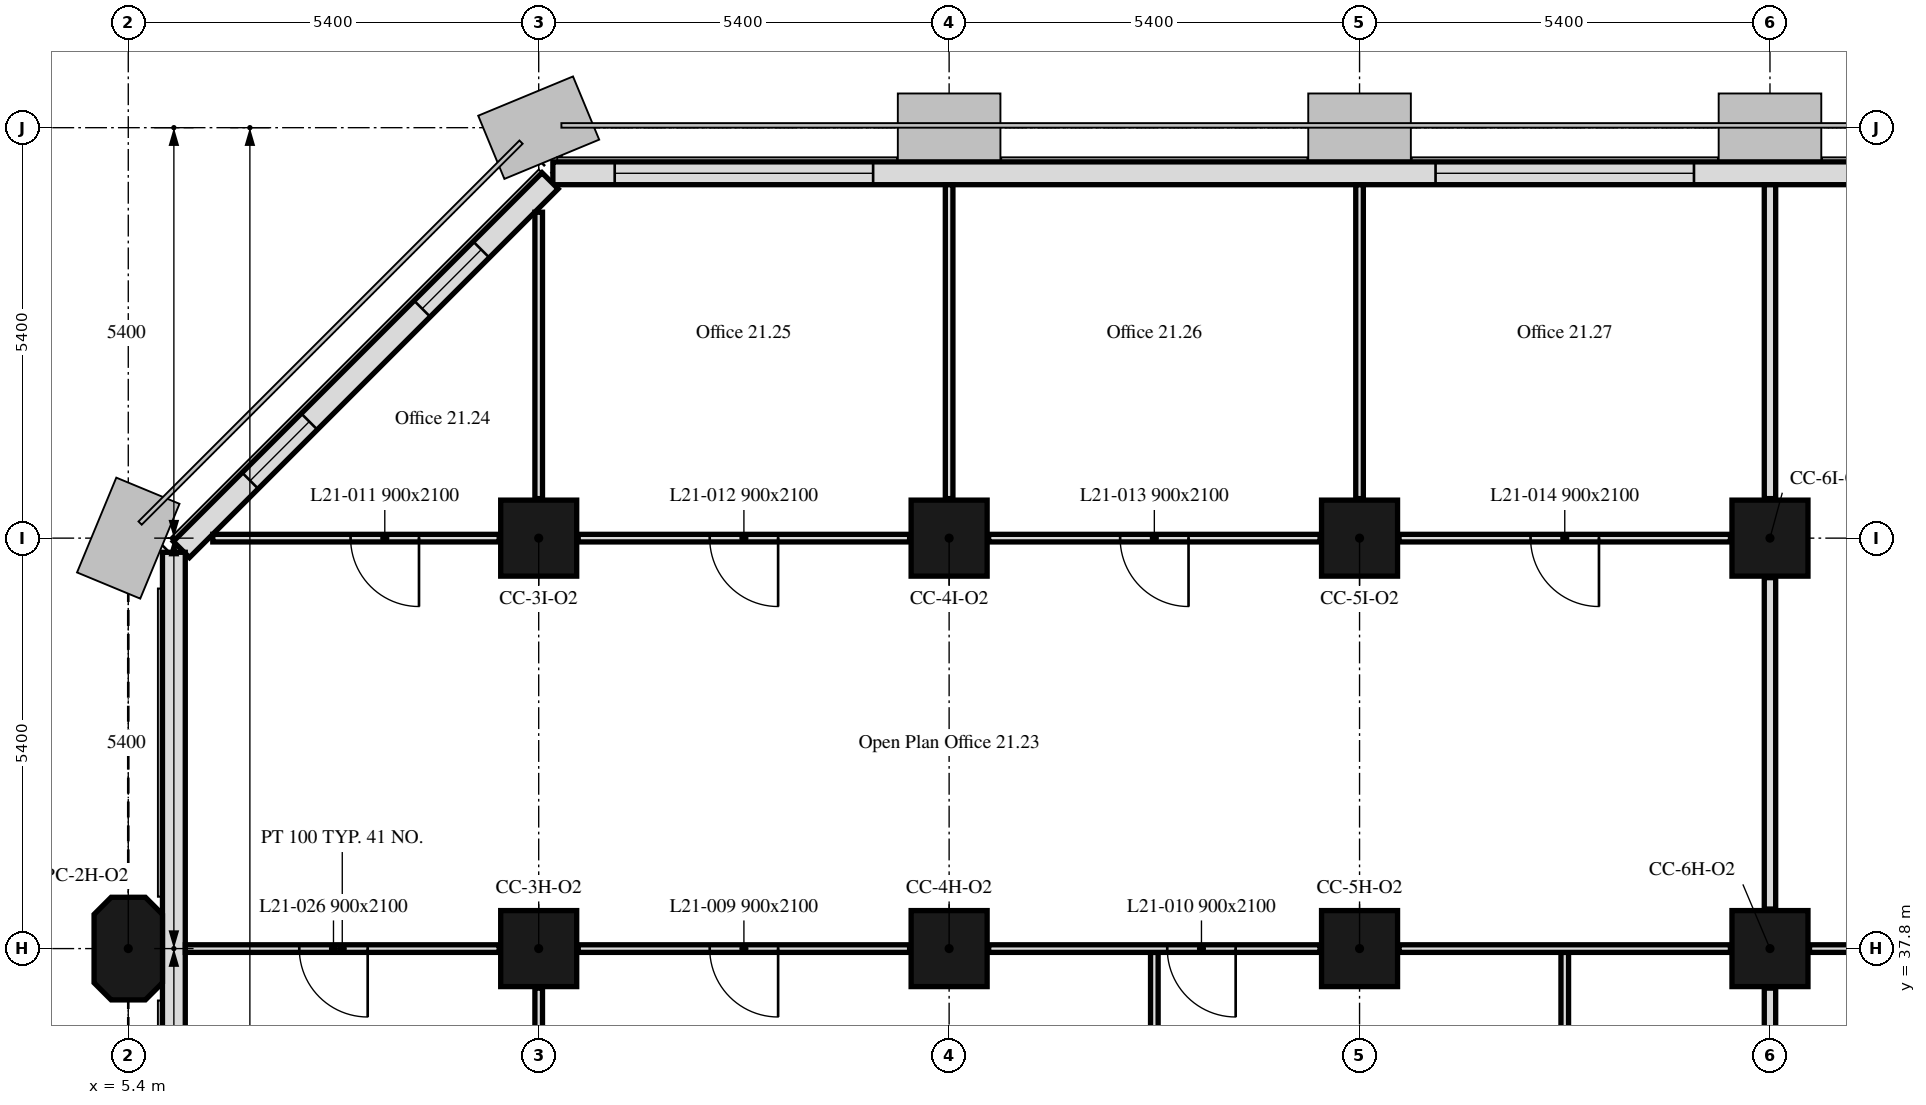
"""IFC4 building model, lengths in metres.
Left out: names, types, materials, properties, quantities, classifications, styles, units other than length and angle.
Written with IfcOpenShell. Run it as: python <this file> out.ifc"""

import sys

from ifc_helpers import new_model, si_unit, direction, frame, frame_2d, origin, origin_2d, place, context, subcontext, project, spatial, polyline, rectangle, outline, extrude, element, fill, save


model = new_model("IFC4")
c1 = context("Model", 3, precision=1e-05, world=origin(), true_north=direction((0.0, 1.0)))
c2 = subcontext(c1, "Body", "Model", "MODEL_VIEW")
j1 = project(units=[si_unit("LENGTHUNIT", "METRE"), si_unit("PLANEANGLEUNIT", "RADIAN")], contexts=[c1])
p1 = place(None, origin())
s1 = spatial("IfcSite", under=j1, at=p1, CompositionType="ELEMENT")
p2 = place(p1, origin())
s2 = spatial("IfcBuilding", under=s1, at=p2, CompositionType="ELEMENT")
p3 = place(p2, frame((0.0, 0.0, 91.6)))
s3 = spatial("IfcBuildingStorey", under=s2, at=p3, CompositionType="ELEMENT", Elevation=91.6)
p4 = place(p3, frame((5.4, 37.8, 0.0), z_axis=(0.0, 0.0, 1.0), x_axis=(0.0, 1.0, 0.0)))
e1 = element("IfcColumn", 1, at=p4, inside=s3, PredefinedType="COLUMN", context=c2, shape_type="SweptSolid", body=[
    extrude(outline(polyline([(-0.45, -0.45), (0.45, -0.45), (0.675, -0.225), (0.675, 0.225), (0.45, 0.45), (-0.45, 0.45), (-0.675, 0.225), (-0.675, -0.225), (-0.45, -0.45)])), origin(), (0.0, 0.0, 1.0), 3.5),
])
for number, where, z_axis, x_axis in (
    (2, (10.8, 37.8, 0.0), (0.0, 0.0, 1.0), (1.0, 0.0, 0.0)),
    (3, (16.2, 37.8, 0.0), (0.0, 0.0, 1.0), (1.0, 0.0, 0.0)),
    (4, (21.6, 37.8, 0.0), (0.0, 0.0, 1.0), (1.0, 0.0, 0.0)),
    (5, (27.0, 37.8, 0.0), (0.0, 0.0, 1.0), (1.0, 0.0, 0.0)),
    (6, (10.8, 43.2, 0.0), (0.0, 0.0, 1.0), (1.0, 0.0, 0.0)),
    (7, (16.2, 43.2, 0.0), (0.0, 0.0, 1.0), (1.0, 0.0, 0.0)),
    (8, (21.6, 43.2, 0.0), (0.0, 0.0, 1.0), (1.0, 0.0, 0.0)),
    (9, (27.0, 43.2, 0.0), (0.0, 0.0, 1.0), (1.0, 0.0, 0.0)),
):
    element("IfcColumn", number, at=place(p3, frame(where, z_axis=z_axis, x_axis=x_axis)), inside=s3, PredefinedType="COLUMN", context=c2, shape_type="SweptSolid", body=[
        extrude(rectangle(XDim=1.0, YDim=1.0, at=origin_2d()), origin(), (0.0, 0.0, 1.0), 3.5),
    ])
p5 = place(p3, frame((43.014, 48.0, 0.0), z_axis=(0.0, 0.0, 1.0), x_axis=(-1.0, 0.0, 0.0)))
e10 = element("IfcWall", 10, at=p5, inside=s3, PredefinedType="SOLIDWALL", context=c2, shape_type="SweptSolid", body=[
    extrude(rectangle(XDim=32.027, YDim=0.3, at=frame_2d((16.014, 0.0))), origin(), (0.0, 0.0, 1.0), 3.5),
])
p6 = place(p5, frame((6.214, 0.0, 0.9)))
e11 = element("IfcOpeningElement", 11, at=p6, cuts=e10, PredefinedType="OPENING", context=c2, shape_type="SweptSolid", body=[
    extrude(rectangle(XDim=3.4, YDim=1.7, at=frame_2d((1.7, 0.85))), frame((0.0, 0.16, 0.0), z_axis=(0.0, -1.0, 0.0), x_axis=(1.0, 0.0, 0.0)), (0.0, 0.0, 1.0), 0.32),
])
p7 = place(p5, frame((17.014, 0.0, 0.9)))
e12 = element("IfcOpeningElement", 12, at=p7, cuts=e10, PredefinedType="OPENING", context=c2, shape_type="SweptSolid", body=[
    extrude(rectangle(XDim=3.4, YDim=1.7, at=frame_2d((1.7, 0.85))), frame((0.0, 0.16, 0.0), z_axis=(0.0, -1.0, 0.0), x_axis=(1.0, 0.0, 0.0)), (0.0, 0.0, 1.0), 0.32),
])
p8 = place(p5, frame((27.814, 0.0, 0.9)))
e13 = element("IfcOpeningElement", 13, at=p8, cuts=e10, PredefinedType="OPENING", context=c2, shape_type="SweptSolid", body=[
    extrude(rectangle(XDim=3.4, YDim=1.7, at=frame_2d((1.7, 0.85))), frame((0.0, 0.16, 0.0), z_axis=(0.0, -1.0, 0.0), x_axis=(1.0, 0.0, 0.0)), (0.0, 0.0, 1.0), 0.32),
])
p9 = place(p3, frame((10.949, 47.901, 0.0), z_axis=(0.0, 0.0, 1.0), x_axis=(-0.707106781187, -0.707106781187, 0.0)))
e14 = element("IfcWall", 14, at=p9, inside=s3, PredefinedType="SOLIDWALL", context=c2, shape_type="SweptSolid", body=[
    extrude(rectangle(XDim=6.86, YDim=0.3, at=frame_2d((3.43, 0.0))), origin(), (0.0, 0.0, 1.0), 3.5),
])
p10 = place(p9, frame((1.28, 0.0, 0.9)))
e15 = element("IfcOpeningElement", 15, at=p10, cuts=e14, PredefinedType="OPENING", context=c2, shape_type="SweptSolid", body=[
    extrude(rectangle(XDim=1.1, YDim=1.7, at=frame_2d((0.55, 0.85))), frame((0.0, 0.16, 0.0), z_axis=(0.0, -1.0, 0.0), x_axis=(1.0, 0.0, 0.0)), (0.0, 0.0, 1.0), 0.32),
])
p11 = place(p9, frame((4.48, 0.0, 0.9)))
e16 = element("IfcOpeningElement", 16, at=p11, cuts=e14, PredefinedType="OPENING", context=c2, shape_type="SweptSolid", body=[
    extrude(rectangle(XDim=1.1, YDim=1.7, at=frame_2d((0.55, 0.85))), frame((0.0, 0.16, 0.0), z_axis=(0.0, -1.0, 0.0), x_axis=(1.0, 0.0, 0.0)), (0.0, 0.0, 1.0), 0.32),
])
p12 = place(p3, frame((6.0, 43.014, 0.0), z_axis=(0.0, 0.0, 1.0), x_axis=(0.0, -1.0, 0.0)))
e17 = element("IfcWall", 17, at=p12, inside=s3, PredefinedType="SOLIDWALL", context=c2, shape_type="SweptSolid", body=[
    extrude(rectangle(XDim=10.614, YDim=0.3, at=frame_2d((5.307, 0.0))), origin(), (0.0, 0.0, 1.0), 3.5),
])
p13 = place(p12, frame((6.564, 0.0, 0.9)))
e18 = element("IfcOpeningElement", 18, at=p13, cuts=e17, PredefinedType="OPENING", context=c2, shape_type="SweptSolid", body=[
    extrude(rectangle(XDim=1.1, YDim=1.7, at=frame_2d((0.55, 0.85))), frame((0.0, 0.16, 0.0), z_axis=(0.0, -1.0, 0.0), x_axis=(1.0, 0.0, 0.0)), (0.0, 0.0, 1.0), 0.32),
])
p14 = place(p12, frame((8.164, 0.0, 0.9)))
e19 = element("IfcOpeningElement", 19, at=p14, cuts=e17, PredefinedType="OPENING", context=c2, shape_type="SweptSolid", body=[
    extrude(rectangle(XDim=1.1, YDim=1.7, at=frame_2d((0.55, 0.85))), frame((0.0, 0.16, 0.0), z_axis=(0.0, -1.0, 0.0), x_axis=(1.0, 0.0, 0.0)), (0.0, 0.0, 1.0), 0.32),
])
p15 = place(p3, frame((10.28, 37.8, 0.0), z_axis=(0.0, 0.0, 1.0), x_axis=(-1.0, 0.0, 0.0)))
e20 = element("IfcWall", 20, at=p15, inside=s3, PredefinedType="PARTITIONING", context=c2, shape_type="SweptSolid", body=[
    extrude(rectangle(XDim=4.129, YDim=0.1, at=frame_2d((2.064, 0.0))), origin(), (0.0, 0.0, 1.0), 2.75),
])
p16 = place(p15, frame((1.73, 0.0, 0.0)))
e21 = element("IfcOpeningElement", 21, at=p16, cuts=e20, PredefinedType="OPENING", context=c2, shape_type="SweptSolid", body=[
    extrude(rectangle(XDim=0.9, YDim=2.1, at=frame_2d((0.45, 1.05))), frame((0.0, 0.05, 0.0), z_axis=(0.0, -1.0, 0.0), x_axis=(1.0, 0.0, 0.0)), (0.0, 0.0, 1.0), 0.1),
])
p17 = place(p3, frame((10.8, 35.175, 0.0), z_axis=(0.0, 0.0, 1.0), x_axis=(0.0, 1.0, 0.0)))
e22 = element("IfcWall", 22, at=p17, inside=s3, PredefinedType="PARTITIONING", context=c2, shape_type="SweptSolid", body=[
    extrude(rectangle(XDim=2.105, YDim=0.1, at=frame_2d((1.052, 0.0))), origin(), (0.0, 0.0, 1.0), 2.75),
])
p18 = place(p3, frame((18.9, 35.175, 0.0), z_axis=(0.0, 0.0, 1.0), x_axis=(0.0, 1.0, 0.0)))
e23 = element("IfcWall", 23, at=p18, inside=s3, PredefinedType="PARTITIONING", context=c2, shape_type="SweptSolid", body=[
    extrude(rectangle(XDim=2.575, YDim=0.1, at=frame_2d((1.288, 0.0))), origin(), (0.0, 0.0, 1.0), 3.5),
])
p19 = place(p3, frame((15.68, 37.8, 0.0), z_axis=(0.0, 0.0, 1.0), x_axis=(-1.0, 0.0, 0.0)))
e24 = element("IfcWall", 24, at=p19, inside=s3, PredefinedType="PARTITIONING", context=c2, shape_type="SweptSolid", body=[
    extrude(rectangle(XDim=4.36, YDim=0.1, at=frame_2d((2.18, 0.0))), origin(), (0.0, 0.0, 1.0), 2.75),
])
p20 = place(p19, frame((1.73, 0.0, 0.0)))
e25 = element("IfcOpeningElement", 25, at=p20, cuts=e24, PredefinedType="OPENING", context=c2, shape_type="SweptSolid", body=[
    extrude(rectangle(XDim=0.9, YDim=2.1, at=frame_2d((0.45, 1.05))), frame((0.0, 0.05, 0.0), z_axis=(0.0, -1.0, 0.0), x_axis=(1.0, 0.0, 0.0)), (0.0, 0.0, 1.0), 0.1),
])
p21 = place(p3, frame((24.3, 35.175, 0.0), z_axis=(0.0, 0.0, 1.0), x_axis=(0.0, 1.0, 0.0)))
e26 = element("IfcWall", 26, at=p21, inside=s3, PredefinedType="PARTITIONING", context=c2, shape_type="SweptSolid", body=[
    extrude(rectangle(XDim=2.575, YDim=0.1, at=frame_2d((1.288, 0.0))), origin(), (0.0, 0.0, 1.0), 3.5),
])
p22 = place(p3, frame((21.08, 37.8, 0.0), z_axis=(0.0, 0.0, 1.0), x_axis=(-1.0, 0.0, 0.0)))
e27 = element("IfcWall", 27, at=p22, inside=s3, PredefinedType="PARTITIONING", context=c2, shape_type="SweptSolid", body=[
    extrude(rectangle(XDim=4.36, YDim=0.1, at=frame_2d((2.18, 0.0))), origin(), (0.0, 0.0, 1.0), 3.5),
])
p23 = place(p22, frame((1.11, 0.0, 0.0)))
e28 = element("IfcOpeningElement", 28, at=p23, cuts=e27, PredefinedType="OPENING", context=c2, shape_type="SweptSolid", body=[
    extrude(rectangle(XDim=0.9, YDim=2.1, at=frame_2d((0.45, 1.05))), frame((0.0, 0.05, 0.0), z_axis=(0.0, -1.0, 0.0), x_axis=(1.0, 0.0, 0.0)), (0.0, 0.0, 1.0), 0.1),
])
p24 = place(p3, frame((27.0, 35.175, 0.0), z_axis=(0.0, 0.0, 1.0), x_axis=(0.0, 1.0, 0.0)))
e29 = element("IfcWall", 29, at=p24, inside=s3, PredefinedType="PARTITIONING", context=c2, shape_type="SweptSolid", body=[
    extrude(rectangle(XDim=2.105, YDim=0.15, at=frame_2d((1.052, 0.0))), origin(), (0.0, 0.0, 1.0), 2.75),
])
p25 = place(p3, frame((26.48, 37.8, 0.0), z_axis=(0.0, 0.0, 1.0), x_axis=(-1.0, 0.0, 0.0)))
e30 = element("IfcWall", 30, at=p25, inside=s3, PredefinedType="PARTITIONING", context=c2, shape_type="SweptSolid", body=[
    extrude(rectangle(XDim=4.36, YDim=0.1, at=frame_2d((2.18, 0.0))), origin(), (0.0, 0.0, 1.0), 3.5),
])
p26 = place(p3, frame((26.48, 43.2, 0.0), z_axis=(0.0, 0.0, 1.0), x_axis=(-1.0, 0.0, 0.0)))
e31 = element("IfcWall", 31, at=p26, inside=s3, PredefinedType="PARTITIONING", context=c2, shape_type="SweptSolid", body=[
    extrude(rectangle(XDim=4.36, YDim=0.1, at=frame_2d((2.18, 0.0))), origin(), (0.0, 0.0, 1.0), 3.5),
])
p27 = place(p26, frame((1.73, 0.0, 0.0)))
e32 = element("IfcOpeningElement", 32, at=p27, cuts=e31, PredefinedType="OPENING", context=c2, shape_type="SweptSolid", body=[
    extrude(rectangle(XDim=0.9, YDim=2.1, at=frame_2d((0.45, 1.05))), frame((0.0, 0.05, 0.0), z_axis=(0.0, -1.0, 0.0), x_axis=(1.0, 0.0, 0.0)), (0.0, 0.0, 1.0), 0.1),
])
p28 = place(p3, frame((21.08, 43.2, 0.0), z_axis=(0.0, 0.0, 1.0), x_axis=(-1.0, 0.0, 0.0)))
e33 = element("IfcWall", 33, at=p28, inside=s3, PredefinedType="PARTITIONING", context=c2, shape_type="SweptSolid", body=[
    extrude(rectangle(XDim=4.36, YDim=0.1, at=frame_2d((2.18, 0.0))), origin(), (0.0, 0.0, 1.0), 3.5),
])
p29 = place(p28, frame((1.73, 0.0, 0.0)))
e34 = element("IfcOpeningElement", 34, at=p29, cuts=e33, PredefinedType="OPENING", context=c2, shape_type="SweptSolid", body=[
    extrude(rectangle(XDim=0.9, YDim=2.1, at=frame_2d((0.45, 1.05))), frame((0.0, 0.05, 0.0), z_axis=(0.0, -1.0, 0.0), x_axis=(1.0, 0.0, 0.0)), (0.0, 0.0, 1.0), 0.1),
])
p30 = place(p3, frame((15.68, 43.2, 0.0), z_axis=(0.0, 0.0, 1.0), x_axis=(-1.0, 0.0, 0.0)))
e35 = element("IfcWall", 35, at=p30, inside=s3, PredefinedType="PARTITIONING", context=c2, shape_type="SweptSolid", body=[
    extrude(rectangle(XDim=4.36, YDim=0.1, at=frame_2d((2.18, 0.0))), origin(), (0.0, 0.0, 1.0), 3.5),
])
p31 = place(p30, frame((1.73, 0.0, 0.0)))
e36 = element("IfcOpeningElement", 36, at=p31, cuts=e35, PredefinedType="OPENING", context=c2, shape_type="SweptSolid", body=[
    extrude(rectangle(XDim=0.9, YDim=2.1, at=frame_2d((0.45, 1.05))), frame((0.0, 0.05, 0.0), z_axis=(0.0, -1.0, 0.0), x_axis=(1.0, 0.0, 0.0)), (0.0, 0.0, 1.0), 0.1),
])
p32 = place(p3, frame((10.28, 43.2, 0.0), z_axis=(0.0, 0.0, 1.0), x_axis=(-1.0, 0.0, 0.0)))
e37 = element("IfcWall", 37, at=p32, inside=s3, PredefinedType="PARTITIONING", context=c2, shape_type="SweptSolid", body=[
    extrude(rectangle(XDim=3.768, YDim=0.1, at=frame_2d((1.884, 0.0))), origin(), (0.0, 0.0, 1.0), 3.5),
])
p33 = place(p32, frame((1.055, 0.0, 0.0)))
e38 = element("IfcOpeningElement", 38, at=p33, cuts=e37, PredefinedType="OPENING", context=c2, shape_type="SweptSolid", body=[
    extrude(rectangle(XDim=0.9, YDim=2.1, at=frame_2d((0.45, 1.05))), frame((0.0, 0.05, 0.0), z_axis=(0.0, -1.0, 0.0), x_axis=(1.0, 0.0, 0.0)), (0.0, 0.0, 1.0), 0.1),
])
p34 = place(p3, frame((27.0, 38.32, 0.0), z_axis=(0.0, 0.0, 1.0), x_axis=(0.0, 1.0, 0.0)))
e39 = element("IfcWall", 39, at=p34, inside=s3, PredefinedType="PARTITIONING", context=c2, shape_type="SweptSolid", body=[
    extrude(rectangle(XDim=4.36, YDim=0.15, at=frame_2d((2.18, 0.0))), origin(), (0.0, 0.0, 1.0), 2.75),
])
p35 = place(p3, frame((10.8, 43.72, 0.0), z_axis=(0.0, 0.0, 1.0), x_axis=(0.0, 1.0, 0.0)))
e40 = element("IfcWall", 40, at=p35, inside=s3, PredefinedType="PARTITIONING", context=c2, shape_type="SweptSolid", body=[
    extrude(rectangle(XDim=3.768, YDim=0.1, at=frame_2d((1.884, 0.0))), origin(), (0.0, 0.0, 1.0), 2.75),
])
for number, where, z_axis, x_axis in (
    (41, (16.2, 43.72, 0.0), (0.0, 0.0, 1.0), (0.0, 1.0, 0.0)),
    (42, (21.6, 43.72, 0.0), (0.0, 0.0, 1.0), (0.0, 1.0, 0.0)),
):
    element("IfcWall", number, at=place(p3, frame(where, z_axis=z_axis, x_axis=x_axis)), inside=s3, PredefinedType="PARTITIONING", context=c2, shape_type="SweptSolid", body=[
        extrude(rectangle(XDim=4.129, YDim=0.1, at=frame_2d((2.064, 0.0))), origin(), (0.0, 0.0, 1.0), 2.75),
    ])
p36 = place(p3, frame((27.0, 43.72, 0.0), z_axis=(0.0, 0.0, 1.0), x_axis=(0.0, 1.0, 0.0)))
e43 = element("IfcWall", 43, at=p36, inside=s3, PredefinedType="PARTITIONING", context=c2, shape_type="SweptSolid", body=[
    extrude(rectangle(XDim=4.129, YDim=0.15, at=frame_2d((2.064, 0.0))), origin(), (0.0, 0.0, 1.0), 2.75),
])
p37 = place(p3, frame((31.88, 37.8, 0.0), z_axis=(0.0, 0.0, 1.0), x_axis=(-1.0, 0.0, 0.0)))
e44 = element("IfcWall", 44, at=p37, inside=s3, PredefinedType="PARTITIONING", context=c2, shape_type="SweptSolid", body=[
    extrude(rectangle(XDim=4.36, YDim=0.1, at=frame_2d((2.18, 0.0))), origin(), (0.0, 0.0, 1.0), 3.5),
])
p38 = place(p37, frame((1.73, 0.0, 0.0)))
e45 = element("IfcOpeningElement", 45, at=p38, cuts=e44, PredefinedType="OPENING", context=c2, shape_type="SweptSolid", body=[
    extrude(rectangle(XDim=0.9, YDim=2.1, at=frame_2d((0.45, 1.05))), frame((0.0, 0.05, 0.0), z_axis=(0.0, -1.0, 0.0), x_axis=(1.0, 0.0, 0.0)), (0.0, 0.0, 1.0), 0.1),
])
p39 = place(p7, origin())
e46 = element("IfcWindow", 46, at=p39, inside=s3, PartitioningType="SINGLE_PANEL", PredefinedType="WINDOW", context=c2, shape_type="SweptSolid", body=[
    extrude(rectangle(XDim=3.4, YDim=1.7, at=frame_2d((1.7, 0.85))), frame((0.0, 0.03, 0.0), z_axis=(0.0, -1.0, 0.0), x_axis=(1.0, 0.0, 0.0)), (0.0, 0.0, 1.0), 0.06),
])
fill(e12, e46)
p40 = place(p8, origin())
e47 = element("IfcWindow", 47, at=p40, inside=s3, PartitioningType="SINGLE_PANEL", PredefinedType="WINDOW", context=c2, shape_type="SweptSolid", body=[
    extrude(rectangle(XDim=3.4, YDim=1.7, at=frame_2d((1.7, 0.85))), frame((0.0, 0.03, 0.0), z_axis=(0.0, -1.0, 0.0), x_axis=(1.0, 0.0, 0.0)), (0.0, 0.0, 1.0), 0.06),
])
fill(e13, e47)
p41 = place(p10, origin())
e48 = element("IfcWindow", 48, at=p41, inside=s3, PartitioningType="SINGLE_PANEL", PredefinedType="WINDOW", context=c2, shape_type="SweptSolid", body=[
    extrude(rectangle(XDim=1.1, YDim=1.7, at=frame_2d((0.55, 0.85))), frame((0.0, 0.03, 0.0), z_axis=(0.0, -1.0, 0.0), x_axis=(1.0, 0.0, 0.0)), (0.0, 0.0, 1.0), 0.06),
])
fill(e15, e48)
p42 = place(p11, origin())
e49 = element("IfcWindow", 49, at=p42, inside=s3, PartitioningType="SINGLE_PANEL", PredefinedType="WINDOW", context=c2, shape_type="SweptSolid", body=[
    extrude(rectangle(XDim=1.1, YDim=1.7, at=frame_2d((0.55, 0.85))), frame((0.0, 0.03, 0.0), z_axis=(0.0, -1.0, 0.0), x_axis=(1.0, 0.0, 0.0)), (0.0, 0.0, 1.0), 0.06),
])
fill(e16, e49)
p43 = place(p20, origin())
e50 = element("IfcDoor", 50, at=p43, inside=s3, OperationType="SINGLE_SWING_RIGHT", PredefinedType="DOOR", context=c2, shape_type="SweptSolid", body=[
    extrude(rectangle(XDim=0.9, YDim=2.1, at=frame_2d((0.45, 1.05))), frame((0.0, 0.025, 0.0), z_axis=(0.0, -1.0, 0.0), x_axis=(1.0, 0.0, 0.0)), (0.0, 0.0, 1.0), 0.05),
])
fill(e25, e50)
p44 = place(p23, origin())
e51 = element("IfcDoor", 51, at=p44, inside=s3, OperationType="SINGLE_SWING_RIGHT", PredefinedType="DOOR", context=c2, shape_type="SweptSolid", body=[
    extrude(rectangle(XDim=0.9, YDim=2.1, at=frame_2d((0.45, 1.05))), frame((0.0, 0.025, 0.0), z_axis=(0.0, -1.0, 0.0), x_axis=(1.0, 0.0, 0.0)), (0.0, 0.0, 1.0), 0.05),
])
fill(e28, e51)
p45 = place(p33, origin())
e52 = element("IfcDoor", 52, at=p45, inside=s3, OperationType="SINGLE_SWING_RIGHT", PredefinedType="DOOR", context=c2, shape_type="SweptSolid", body=[
    extrude(rectangle(XDim=0.9, YDim=2.1, at=frame_2d((0.45, 1.05))), frame((0.0, 0.025, 0.0), z_axis=(0.0, -1.0, 0.0), x_axis=(1.0, 0.0, 0.0)), (0.0, 0.0, 1.0), 0.05),
])
fill(e38, e52)
p46 = place(p31, origin())
e53 = element("IfcDoor", 53, at=p46, inside=s3, OperationType="SINGLE_SWING_RIGHT", PredefinedType="DOOR", context=c2, shape_type="SweptSolid", body=[
    extrude(rectangle(XDim=0.9, YDim=2.1, at=frame_2d((0.45, 1.05))), frame((0.0, 0.025, 0.0), z_axis=(0.0, -1.0, 0.0), x_axis=(1.0, 0.0, 0.0)), (0.0, 0.0, 1.0), 0.05),
])
fill(e36, e53)
p47 = place(p29, origin())
e54 = element("IfcDoor", 54, at=p47, inside=s3, OperationType="SINGLE_SWING_RIGHT", PredefinedType="DOOR", context=c2, shape_type="SweptSolid", body=[
    extrude(rectangle(XDim=0.9, YDim=2.1, at=frame_2d((0.45, 1.05))), frame((0.0, 0.025, 0.0), z_axis=(0.0, -1.0, 0.0), x_axis=(1.0, 0.0, 0.0)), (0.0, 0.0, 1.0), 0.05),
])
fill(e34, e54)
p48 = place(p27, origin())
e55 = element("IfcDoor", 55, at=p48, inside=s3, OperationType="SINGLE_SWING_RIGHT", PredefinedType="DOOR", context=c2, shape_type="SweptSolid", body=[
    extrude(rectangle(XDim=0.9, YDim=2.1, at=frame_2d((0.45, 1.05))), frame((0.0, 0.025, 0.0), z_axis=(0.0, -1.0, 0.0), x_axis=(1.0, 0.0, 0.0)), (0.0, 0.0, 1.0), 0.05),
])
fill(e32, e55)
p49 = place(p16, origin())
e56 = element("IfcDoor", 56, at=p49, inside=s3, OperationType="SINGLE_SWING_LEFT", PredefinedType="DOOR", context=c2, shape_type="SweptSolid", body=[
    extrude(rectangle(XDim=0.9, YDim=2.1, at=frame_2d((0.45, 1.05))), frame((0.0, 0.025, 0.0), z_axis=(0.0, -1.0, 0.0), x_axis=(1.0, 0.0, 0.0)), (0.0, 0.0, 1.0), 0.05),
])
fill(e21, e56)
save(model, sys.argv[1])
